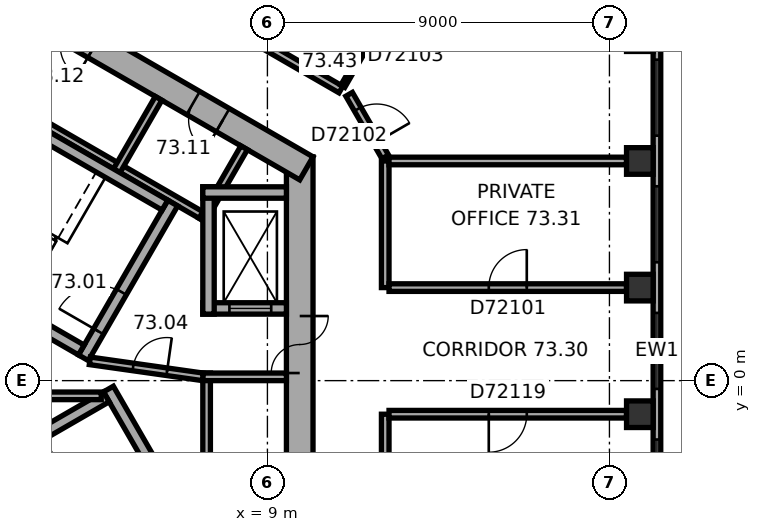
"""IFC4 building model, lengths in metres.
Left out: names, types, materials, properties, quantities, classifications, styles, units other than length and angle.
Written with IfcOpenShell. Run it as: python <this file> out.ifc"""

import sys

from ifc_helpers import new_model, si_unit, direction, frame, frame_2d, origin, origin_2d, place, context, subcontext, project, spatial, rectangle, extrude, element, fill, save


model = new_model("IFC4")
c1 = context("Model", 3, precision=1e-05, world=origin(), true_north=direction((0.0, 1.0)))
c2 = subcontext(c1, "Body", "Model", "MODEL_VIEW")
j1 = project(units=[si_unit("LENGTHUNIT", "METRE"), si_unit("PLANEANGLEUNIT", "RADIAN")], contexts=[c1])
p1 = place(None, origin())
s1 = spatial("IfcSite", under=j1, at=p1, CompositionType="ELEMENT")
p2 = place(p1, origin())
s2 = spatial("IfcBuilding", under=s1, at=p2, CompositionType="ELEMENT")
p3 = place(p2, frame((0.0, 0.0, 296.8)))
s3 = spatial("IfcBuildingStorey", under=s2, at=p3, CompositionType="ELEMENT", Elevation=296.8)
for number, where, z_axis, x_axis in (
    (1, (18.8, -0.883, 0.0), (0.0, 0.0, 1.0), (0.0, 1.0, 0.0)),
    (2, (18.8, 2.448, 0.0), (0.0, 0.0, 1.0), (0.0, 1.0, 0.0)),
    (3, (18.8, 5.78, 0.0), (0.0, 0.0, 1.0), (0.0, 1.0, 0.0)),
):
    element("IfcColumn", number, at=place(p3, frame(where, z_axis=z_axis, x_axis=x_axis)), inside=s3, PredefinedType="COLUMN", context=c2, shape_type="SweptSolid", body=[
        extrude(rectangle(XDim=0.7, YDim=0.7, at=origin_2d()), origin(), (0.0, 0.0, 1.0), 3.7),
    ])
p4 = place(p3, frame((9.85, -5.889, 0.0), z_axis=(0.0, 0.0, 1.0), x_axis=(0.0, 1.0, 0.0)))
e4 = element("IfcWall", 4, at=p4, inside=s3, PredefinedType="SHEAR", context=c2, shape_type="SweptSolid", body=[
    extrude(rectangle(XDim=11.778, YDim=0.7, at=frame_2d((5.889, 0.0))), origin(), (0.0, 0.0, 1.0), 3.7),
])
p5 = place(p4, frame((6.089, 0.0, 0.0)))
e5 = element("IfcOpeningElement", 5, at=p5, cuts=e4, PredefinedType="OPENING", context=c2, shape_type="SweptSolid", body=[
    extrude(rectangle(XDim=1.5, YDim=2.1, at=frame_2d((0.75, 1.05))), frame((0.0, 0.36, 0.0), z_axis=(0.0, -1.0, 0.0), x_axis=(1.0, 0.0, 0.0)), (0.0, 0.0, 1.0), 0.72),
])
p6 = place(p4, frame((2.939, 0.0, 0.0)))
e6 = element("IfcOpeningElement", 6, at=p6, cuts=e4, PredefinedType="OPENING", context=c2, shape_type="SweptSolid", body=[
    extrude(rectangle(XDim=0.9, YDim=2.1, at=frame_2d((0.45, 1.05))), frame((0.0, 0.36, 0.0), z_axis=(0.0, -1.0, 0.0), x_axis=(1.0, 0.0, 0.0)), (0.0, 0.0, 1.0), 0.72),
])
p7 = place(p3, frame((10.025, 5.586, 0.0), z_axis=(0.0, 0.0, 1.0), x_axis=(-0.866026453023, 0.499998182661, 0.0)))
e7 = element("IfcWall", 7, at=p7, inside=s3, PredefinedType="SHEAR", context=c2, shape_type="SweptSolid", body=[
    extrude(rectangle(XDim=11.778, YDim=0.7, at=frame_2d((5.889, 0.0))), origin(), (0.0, 0.0, 1.0), 3.7),
])
p8 = place(p7, frame((2.539, 0.0, 0.0)))
e8 = element("IfcOpeningElement", 8, at=p8, cuts=e7, PredefinedType="OPENING", context=c2, shape_type="SweptSolid", body=[
    extrude(rectangle(XDim=0.9, YDim=2.1, at=frame_2d((0.45, 1.05))), frame((0.0, 0.36, 0.0), z_axis=(0.0, -1.0, 0.0), x_axis=(1.0, 0.0, 0.0)), (0.0, 0.0, 1.0), 0.72),
])
p9 = place(p7, frame((6.439, 0.0, 0.0)))
e9 = element("IfcOpeningElement", 9, at=p9, cuts=e7, PredefinedType="OPENING", context=c2, shape_type="SweptSolid", body=[
    extrude(rectangle(XDim=0.9, YDim=2.1, at=frame_2d((0.45, 1.05))), frame((0.0, 0.36, 0.0), z_axis=(0.0, -1.0, 0.0), x_axis=(1.0, 0.0, 0.0)), (0.0, 0.0, 1.0), 0.72),
])
p10 = place(p3, frame((19.25, -8.084, 0.0), z_axis=(0.0, 0.0, 1.0), x_axis=(0.0, 1.0, 0.0)))
e10 = element("IfcWall", 10, at=p10, inside=s3, PredefinedType="STANDARD", context=c2, shape_type="SweptSolid", body=[
    extrude(rectangle(XDim=17.731, YDim=0.2, at=frame_2d((8.866, 0.0))), origin(), (0.0, 0.0, 1.0), 3.7),
])
p11 = place(p10, frame((1.203, 0.0, 0.9)))
e11 = element("IfcOpeningElement", 11, at=p11, cuts=e10, PredefinedType="OPENING", context=c2, shape_type="SweptSolid", body=[
    extrude(rectangle(XDim=2.0, YDim=2.0, at=frame_2d((1.0, 1.0))), frame((0.0, 0.11, 0.0), z_axis=(0.0, -1.0, 0.0), x_axis=(1.0, 0.0, 0.0)), (0.0, 0.0, 1.0), 0.22),
])
p12 = place(p10, frame((4.535, 0.0, 0.9)))
e12 = element("IfcOpeningElement", 12, at=p12, cuts=e10, PredefinedType="OPENING", context=c2, shape_type="SweptSolid", body=[
    extrude(rectangle(XDim=2.0, YDim=2.0, at=frame_2d((1.0, 1.0))), frame((0.0, 0.11, 0.0), z_axis=(0.0, -1.0, 0.0), x_axis=(1.0, 0.0, 0.0)), (0.0, 0.0, 1.0), 0.22),
])
p13 = place(p10, frame((7.866, 0.0, 0.9)))
e13 = element("IfcOpeningElement", 13, at=p13, cuts=e10, PredefinedType="OPENING", context=c2, shape_type="SweptSolid", body=[
    extrude(rectangle(XDim=2.0, YDim=2.0, at=frame_2d((1.0, 1.0))), frame((0.0, 0.11, 0.0), z_axis=(0.0, -1.0, 0.0), x_axis=(1.0, 0.0, 0.0)), (0.0, 0.0, 1.0), 0.22),
])
p14 = place(p10, frame((11.198, 0.0, 0.9)))
e14 = element("IfcOpeningElement", 14, at=p14, cuts=e10, PredefinedType="OPENING", context=c2, shape_type="SweptSolid", body=[
    extrude(rectangle(XDim=2.0, YDim=2.0, at=frame_2d((1.0, 1.0))), frame((0.0, 0.11, 0.0), z_axis=(0.0, -1.0, 0.0), x_axis=(1.0, 0.0, 0.0)), (0.0, 0.0, 1.0), 0.22),
])
p15 = place(p10, frame((14.53, 0.0, 0.9)))
e15 = element("IfcOpeningElement", 15, at=p15, cuts=e10, PredefinedType="OPENING", context=c2, shape_type="SweptSolid", body=[
    extrude(rectangle(XDim=2.0, YDim=2.0, at=frame_2d((1.0, 1.0))), frame((0.0, 0.11, 0.0), z_axis=(0.0, -1.0, 0.0), x_axis=(1.0, 0.0, 0.0)), (0.0, 0.0, 1.0), 0.22),
])
p16 = place(p3, frame((7.4, -5.2, 0.0), z_axis=(0.0, 0.0, 1.0), x_axis=(0.0, 1.0, 0.0)))
e16 = element("IfcWall", 16, at=p16, inside=s3, PredefinedType="PARTITIONING", context=c2, shape_type="SweptSolid", body=[
    extrude(rectangle(XDim=5.4, YDim=0.2, at=frame_2d((2.7, 0.0))), origin(), (0.0, 0.0, 1.0), 3.35),
])
p17 = place(p3, frame((7.3, 0.1, 0.0), z_axis=(0.0, 0.0, 1.0), x_axis=(1.0, 0.0, 0.0)))
e17 = element("IfcWall", 17, at=p17, inside=s3, PredefinedType="PARTITIONING", context=c2, shape_type="SweptSolid", body=[
    extrude(rectangle(XDim=2.2, YDim=0.2, at=frame_2d((1.1, 0.0))), origin(), (0.0, 0.0, 1.0), 3.35),
])
p18 = place(p3, frame((7.424, 4.259, 0.0), z_axis=(0.0, 0.0, 1.0), x_axis=(-0.866026010844, 0.49999894854, 0.0)))
e18 = element("IfcWall", 18, at=p18, inside=s3, PredefinedType="PARTITIONING", context=c2, shape_type="SweptSolid", body=[
    extrude(rectangle(XDim=8.0, YDim=0.2, at=frame_2d((4.0, 0.0))), origin(), (0.0, 0.0, 1.0), 3.35),
])
for number, where, z_axis, x_axis in (
    (19, (7.287, 4.222, 0.0), (0.0, 0.0, 1.0), (0.5, 0.866, 0.0)),
    (20, (5.036, 5.522, 0.0), (0.0, 0.0, 1.0), (0.5, 0.866, 0.0)),
):
    element("IfcWall", number, at=place(p3, frame(where, z_axis=z_axis, x_axis=x_axis)), inside=s3, PredefinedType="PARTITIONING", context=c2, shape_type="SweptSolid", body=[
        extrude(rectangle(XDim=2.2, YDim=0.2, at=frame_2d((1.1, 0.0))), origin(), (0.0, 0.0, 1.0), 3.35),
    ])
p19 = place(p3, frame((4.158, 0.602, 0.0), z_axis=(0.0, 0.0, 1.0), x_axis=(0.499977259774, 0.866038532462, 0.0)))
e21 = element("IfcWall", 21, at=p19, inside=s3, PredefinedType="SHEAR", context=c2, shape_type="SweptSolid", body=[
    extrude(rectangle(XDim=4.7, YDim=0.3, at=frame_2d((2.35, 0.0))), origin(), (0.0, 0.0, 1.0), 3.35),
])
p20 = place(p19, frame((0.8, 0.0, 0.0)))
e22 = element("IfcOpeningElement", 22, at=p20, cuts=e21, PredefinedType="OPENING", context=c2, shape_type="SweptSolid", body=[
    extrude(rectangle(XDim=1.2, YDim=2.1, at=frame_2d((0.6, 1.05))), frame((0.0, 0.16, 0.0), z_axis=(0.0, -1.0, 0.0), x_axis=(1.0, 0.0, 0.0)), (0.0, 0.0, 1.0), 0.32),
])
for number, where, z_axis, x_axis in (
    (23, (4.103, 0.807, 0.0), (0.0, 0.0, 1.0), (-0.866, 0.5, 0.0)),
    (24, (6.303, 4.617, 0.0), (0.0, 0.0, 1.0), (-0.866, 0.5, 0.0)),
):
    element("IfcWall", number, at=place(p3, frame(where, z_axis=z_axis, x_axis=x_axis)), inside=s3, PredefinedType="SHEAR", context=c2, shape_type="SweptSolid", body=[
        extrude(rectangle(XDim=7.06, YDim=0.3, at=frame_2d((3.53, 0.0))), origin(), (0.0, 0.0, 1.0), 3.35),
    ])
p21 = place(p3, frame((4.816, -0.222, 0.0), z_axis=(0.0, 0.0, 1.0), x_axis=(0.499977259774, -0.866038532462, 0.0)))
e25 = element("IfcWall", 25, at=p21, inside=s3, PredefinedType="SHEAR", context=c2, shape_type="SweptSolid", body=[
    extrude(rectangle(XDim=4.7, YDim=0.3, at=frame_2d((2.35, 0.0))), origin(), (0.0, 0.0, 1.0), 3.35),
])
p22 = place(p3, frame((-1.353, -3.957, 0.0), z_axis=(0.0, 0.0, 1.0), x_axis=(0.866027801685, 0.499995846692, 0.0)))
e26 = element("IfcWall", 26, at=p22, inside=s3, PredefinedType="SHEAR", context=c2, shape_type="SweptSolid", body=[
    extrude(rectangle(XDim=7.06, YDim=0.3, at=frame_2d((3.53, 0.0))), origin(), (0.0, 0.0, 1.0), 3.35),
])
p23 = place(p3, frame((7.3, 1.9, 0.0), z_axis=(0.0, 0.0, 1.0), x_axis=(1.0, 0.0, 0.0)))
e27 = element("IfcWall", 27, at=p23, inside=s3, PredefinedType="SHEAR", context=c2, shape_type="SweptSolid", body=[
    extrude(rectangle(XDim=2.2, YDim=0.3, at=frame_2d((1.1, 0.0))), origin(), (0.0, 0.0, 1.0), 3.35),
])
p24 = place(p23, frame((0.7, 0.0, 0.0)))
e28 = element("IfcOpeningElement", 28, at=p24, cuts=e27, PredefinedType="OPENING", context=c2, shape_type="SweptSolid", body=[
    extrude(rectangle(XDim=1.1, YDim=2.1, at=frame_2d((0.55, 1.05))), frame((0.0, 0.16, 0.0), z_axis=(0.0, -1.0, 0.0), x_axis=(1.0, 0.0, 0.0)), (0.0, 0.0, 1.0), 0.32),
])
p25 = place(p3, frame((7.45, 1.75, 0.0), z_axis=(0.0, 0.0, 1.0), x_axis=(0.0, 1.0, 0.0)))
e29 = element("IfcWall", 29, at=p25, inside=s3, PredefinedType="SHEAR", context=c2, shape_type="SweptSolid", body=[
    extrude(rectangle(XDim=3.35, YDim=0.3, at=frame_2d((1.675, 0.0))), origin(), (0.0, 0.0, 1.0), 3.35),
])
p26 = place(p3, frame((7.3, 4.95, 0.0), z_axis=(0.0, 0.0, 1.0), x_axis=(1.0, 0.0, 0.0)))
e30 = element("IfcWall", 30, at=p26, inside=s3, PredefinedType="SHEAR", context=c2, shape_type="SweptSolid", body=[
    extrude(rectangle(XDim=2.2, YDim=0.3, at=frame_2d((1.1, 0.0))), origin(), (0.0, 0.0, 1.0), 3.35),
])
p27 = place(p3, frame((4.327, 0.521, 0.0), z_axis=(0.0, 0.0, 1.0), x_axis=(0.990124376366, -0.14019172346, 0.0)))
e31 = element("IfcWall", 31, at=p27, inside=s3, PredefinedType="PARTITIONING", context=c2, shape_type="SweptSolid", body=[
    extrude(rectangle(XDim=3.002, YDim=0.2, at=frame_2d((1.501, 0.0))), origin(), (0.0, 0.0, 1.0), 3.35),
])
p28 = place(p27, frame((1.15, 0.0, 0.0)))
e32 = element("IfcOpeningElement", 32, at=p28, cuts=e31, PredefinedType="OPENING", context=c2, shape_type="SweptSolid", body=[
    extrude(rectangle(XDim=0.9, YDim=2.1, at=frame_2d((0.45, 1.05))), frame((0.0, 0.11, 0.0), z_axis=(0.0, -1.0, 0.0), x_axis=(1.0, 0.0, 0.0)), (0.0, 0.0, 1.0), 0.22),
])
p29 = place(p3, frame((-2.72, -0.4, 0.0), z_axis=(0.0, 0.0, 1.0), x_axis=(1.0, 0.0, 0.0)))
e33 = element("IfcWall", 33, at=p29, inside=s3, PredefinedType="PARTITIONING", context=c2, shape_type="SweptSolid", body=[
    extrude(rectangle(XDim=7.347, YDim=0.2, at=frame_2d((3.674, 0.0))), origin(), (0.0, 0.0, 1.0), 3.35),
])
p30 = place(p3, frame((10.934, 7.659, 0.0), z_axis=(0.0, 0.0, 1.0), x_axis=(-0.866034411203, 0.499984398369, 0.0)))
e34 = element("IfcWall", 34, at=p30, inside=s3, PredefinedType="PARTITIONING", context=c2, shape_type="SweptSolid", body=[
    extrude(rectangle(XDim=3.927, YDim=0.2, at=frame_2d((1.963, 0.0))), origin(), (0.0, 0.0, 1.0), 3.35),
])
p31 = place(p3, frame((12.1, -5.639, 0.0), z_axis=(0.0, 0.0, 1.0), x_axis=(0.0, 1.0, 0.0)))
e35 = element("IfcWall", 35, at=p31, inside=s3, PredefinedType="PARTITIONING", context=c2, shape_type="SweptSolid", body=[
    extrude(rectangle(XDim=4.756, YDim=0.2, at=frame_2d((2.378, 0.0))), origin(), (0.0, 0.0, 1.0), 3.35),
])
p32 = place(p3, frame((12.1, 2.448, 0.0), z_axis=(0.0, 0.0, 1.0), x_axis=(0.0, 1.0, 0.0)))
e36 = element("IfcWall", 36, at=p32, inside=s3, PredefinedType="PARTITIONING", context=c2, shape_type="SweptSolid", body=[
    extrude(rectangle(XDim=3.332, YDim=0.2, at=frame_2d((1.666, 0.0))), origin(), (0.0, 0.0, 1.0), 3.35),
])
p33 = place(p3, frame((12.1, 5.889, 0.0), z_axis=(0.0, 0.0, 1.0), x_axis=(-0.500063520245, 0.865988727248, 0.0)))
e37 = element("IfcWall", 37, at=p33, inside=s3, PredefinedType="PARTITIONING", context=c2, shape_type="SweptSolid", body=[
    extrude(rectangle(XDim=1.9, YDim=0.2, at=frame_2d((0.95, 0.0))), origin(), (0.0, 0.0, 1.0), 3.35),
])
p34 = place(p33, frame((0.45, 0.0, 0.0)))
e38 = element("IfcOpeningElement", 38, at=p34, cuts=e37, PredefinedType="OPENING", context=c2, shape_type="SweptSolid", body=[
    extrude(rectangle(XDim=1.0, YDim=2.1, at=frame_2d((0.5, 1.05))), frame((0.0, 0.11, 0.0), z_axis=(0.0, -1.0, 0.0), x_axis=(1.0, 0.0, 0.0)), (0.0, 0.0, 1.0), 0.22),
])
p35 = place(p3, frame((12.2, -0.883, 0.0), z_axis=(0.0, 0.0, 1.0), x_axis=(1.0, 0.0, 0.0)))
e39 = element("IfcWall", 39, at=p35, inside=s3, PredefinedType="PARTITIONING", context=c2, shape_type="SweptSolid", body=[
    extrude(rectangle(XDim=6.25, YDim=0.2, at=frame_2d((3.125, 0.0))), origin(), (0.0, 0.0, 1.0), 2.65),
])
p36 = place(p35, frame((2.625, 0.0, 0.0)))
e40 = element("IfcOpeningElement", 40, at=p36, cuts=e39, PredefinedType="OPENING", context=c2, shape_type="SweptSolid", body=[
    extrude(rectangle(XDim=1.0, YDim=2.1, at=frame_2d((0.5, 1.05))), frame((0.0, 0.11, 0.0), z_axis=(0.0, -1.0, 0.0), x_axis=(1.0, 0.0, 0.0)), (0.0, 0.0, 1.0), 0.22),
])
p37 = place(p3, frame((12.204, 9.859, 0.0), z_axis=(0.0, 0.0, 1.0), x_axis=(-0.500077547548, -0.865980627057, 0.0)))
e41 = element("IfcWall", 41, at=p37, inside=s3, PredefinedType="PARTITIONING", context=c2, shape_type="SweptSolid", body=[
    extrude(rectangle(XDim=2.44, YDim=0.12, at=frame_2d((1.22, 0.0))), origin(), (0.0, 0.0, 1.0), 3.35),
])
p38 = place(p37, frame((0.77, 0.0, 0.0)))
e42 = element("IfcOpeningElement", 42, at=p38, cuts=e41, PredefinedType="OPENING", context=c2, shape_type="SweptSolid", body=[
    extrude(rectangle(XDim=0.9, YDim=2.1, at=frame_2d((0.45, 1.05))), frame((0.0, 0.07, 0.0), z_axis=(0.0, -1.0, 0.0), x_axis=(1.0, 0.0, 0.0)), (0.0, 0.0, 1.0), 0.14),
])
p39 = place(p3, frame((18.45, 2.448, 0.0), z_axis=(0.0, 0.0, 1.0), x_axis=(-1.0, 0.0, 0.0)))
e43 = element("IfcWall", 43, at=p39, inside=s3, PredefinedType="PARTITIONING", context=c2, shape_type="SweptSolid", body=[
    extrude(rectangle(XDim=6.25, YDim=0.2, at=frame_2d((3.125, 0.0))), origin(), (0.0, 0.0, 1.0), 3.35),
])
p40 = place(p39, frame((2.625, 0.0, 0.0)))
e44 = element("IfcOpeningElement", 44, at=p40, cuts=e43, PredefinedType="OPENING", context=c2, shape_type="SweptSolid", body=[
    extrude(rectangle(XDim=1.0, YDim=2.1, at=frame_2d((0.5, 1.05))), frame((0.0, 0.11, 0.0), z_axis=(0.0, -1.0, 0.0), x_axis=(1.0, 0.0, 0.0)), (0.0, 0.0, 1.0), 0.22),
])
p41 = place(p3, frame((18.45, 5.78, 0.0), z_axis=(0.0, 0.0, 1.0), x_axis=(-1.0, 0.0, 0.0)))
e45 = element("IfcWall", 45, at=p41, inside=s3, PredefinedType="PARTITIONING", context=c2, shape_type="SweptSolid", body=[
    extrude(rectangle(XDim=6.25, YDim=0.2, at=frame_2d((3.125, 0.0))), origin(), (0.0, 0.0, 1.0), 3.35),
])
p42 = place(p12, origin())
e46 = element("IfcWindow", 46, at=p42, inside=s3, PartitioningType="SINGLE_PANEL", PredefinedType="WINDOW", context=c2, shape_type="SweptSolid", body=[
    extrude(rectangle(XDim=2.0, YDim=2.0, at=frame_2d((1.0, 1.0))), frame((0.0, 0.03, 0.0), z_axis=(0.0, -1.0, 0.0), x_axis=(1.0, 0.0, 0.0)), (0.0, 0.0, 1.0), 0.06),
])
fill(e12, e46)
p43 = place(p13, origin())
e47 = element("IfcWindow", 47, at=p43, inside=s3, PartitioningType="SINGLE_PANEL", PredefinedType="WINDOW", context=c2, shape_type="SweptSolid", body=[
    extrude(rectangle(XDim=2.0, YDim=2.0, at=frame_2d((1.0, 1.0))), frame((0.0, 0.03, 0.0), z_axis=(0.0, -1.0, 0.0), x_axis=(1.0, 0.0, 0.0)), (0.0, 0.0, 1.0), 0.06),
])
fill(e13, e47)
p44 = place(p14, origin())
e48 = element("IfcWindow", 48, at=p44, inside=s3, PartitioningType="SINGLE_PANEL", PredefinedType="WINDOW", context=c2, shape_type="SweptSolid", body=[
    extrude(rectangle(XDim=2.0, YDim=2.0, at=frame_2d((1.0, 1.0))), frame((0.0, 0.03, 0.0), z_axis=(0.0, -1.0, 0.0), x_axis=(1.0, 0.0, 0.0)), (0.0, 0.0, 1.0), 0.06),
])
fill(e14, e48)
p45 = place(p15, origin())
e49 = element("IfcWindow", 49, at=p45, inside=s3, PartitioningType="SINGLE_PANEL", PredefinedType="WINDOW", context=c2, shape_type="SweptSolid", body=[
    extrude(rectangle(XDim=2.0, YDim=2.0, at=frame_2d((1.0, 1.0))), frame((0.0, 0.03, 0.0), z_axis=(0.0, -1.0, 0.0), x_axis=(1.0, 0.0, 0.0)), (0.0, 0.0, 1.0), 0.06),
])
fill(e15, e49)
p46 = place(p5, origin())
e50 = element("IfcDoor", 50, at=p46, inside=s3, OperationType="DOUBLE_DOOR_SINGLE_SWING", PredefinedType="DOOR", context=c2, shape_type="SweptSolid", body=[
    extrude(rectangle(XDim=1.5, YDim=2.1, at=frame_2d((0.75, 1.05))), frame((0.0, 0.025, 0.0), z_axis=(0.0, -1.0, 0.0), x_axis=(1.0, 0.0, 0.0)), (0.0, 0.0, 1.0), 0.05),
])
fill(e5, e50)
p47 = place(p20, origin())
e51 = element("IfcDoor", 51, at=p47, inside=s3, OperationType="SINGLE_SWING_RIGHT", PredefinedType="DOOR", context=c2, shape_type="SweptSolid", body=[
    extrude(rectangle(XDim=1.2, YDim=2.1, at=frame_2d((0.6, 1.05))), frame((0.0, 0.025, 0.0), z_axis=(0.0, -1.0, 0.0), x_axis=(1.0, 0.0, 0.0)), (0.0, 0.0, 1.0), 0.05),
])
fill(e22, e51)
p48 = place(p28, origin())
e52 = element("IfcDoor", 52, at=p48, inside=s3, OperationType="SINGLE_SWING_LEFT", PredefinedType="DOOR", context=c2, shape_type="SweptSolid", body=[
    extrude(rectangle(XDim=0.9, YDim=2.1, at=frame_2d((0.45, 1.05))), frame((0.0, 0.025, 0.0), z_axis=(0.0, -1.0, 0.0), x_axis=(1.0, 0.0, 0.0)), (0.0, 0.0, 1.0), 0.05),
])
fill(e32, e52)
p49 = place(p8, origin())
e53 = element("IfcDoor", 53, at=p49, inside=s3, OperationType="SINGLE_SWING_LEFT", PredefinedType="DOOR", context=c2, shape_type="SweptSolid", body=[
    extrude(rectangle(XDim=0.9, YDim=2.1, at=frame_2d((0.45, 1.05))), frame((0.0, 0.025, 0.0), z_axis=(0.0, -1.0, 0.0), x_axis=(1.0, 0.0, 0.0)), (0.0, 0.0, 1.0), 0.05),
])
fill(e8, e53)
p50 = place(p24, origin())
e54 = element("IfcDoor", 54, at=p50, inside=s3, OperationType="DOUBLE_DOOR_SLIDING", PredefinedType="DOOR", context=c2, shape_type="SweptSolid", body=[
    extrude(rectangle(XDim=1.1, YDim=2.1, at=frame_2d((0.55, 1.05))), frame((0.0, 0.025, 0.0), z_axis=(0.0, -1.0, 0.0), x_axis=(1.0, 0.0, 0.0)), (0.0, 0.0, 1.0), 0.05),
])
fill(e28, e54)
p51 = place(p40, origin())
e55 = element("IfcDoor", 55, at=p51, inside=s3, OperationType="SINGLE_SWING_LEFT", PredefinedType="DOOR", context=c2, shape_type="SweptSolid", body=[
    extrude(rectangle(XDim=1.0, YDim=2.1, at=frame_2d((0.5, 1.05))), frame((0.0, 0.025, 0.0), z_axis=(0.0, -1.0, 0.0), x_axis=(1.0, 0.0, 0.0)), (0.0, 0.0, 1.0), 0.05),
])
fill(e44, e55)
p52 = place(p34, origin())
e56 = element("IfcDoor", 56, at=p52, inside=s3, OperationType="SINGLE_SWING_LEFT", PredefinedType="DOOR", context=c2, shape_type="SweptSolid", body=[
    extrude(rectangle(XDim=1.0, YDim=2.1, at=frame_2d((0.5, 1.05))), frame((0.0, 0.025, 0.0), z_axis=(0.0, -1.0, 0.0), x_axis=(1.0, 0.0, 0.0)), (0.0, 0.0, 1.0), 0.05),
])
fill(e38, e56)
p53 = place(p38, origin())
e57 = element("IfcDoor", 57, at=p53, inside=s3, OperationType="SINGLE_SWING_LEFT", PredefinedType="DOOR", context=c2, shape_type="SweptSolid", body=[
    extrude(rectangle(XDim=0.9, YDim=2.1, at=frame_2d((0.45, 1.05))), frame((0.0, 0.025, 0.0), z_axis=(0.0, -1.0, 0.0), x_axis=(1.0, 0.0, 0.0)), (0.0, 0.0, 1.0), 0.05),
])
fill(e42, e57)
p54 = place(p36, origin())
e58 = element("IfcDoor", 58, at=p54, inside=s3, OperationType="SINGLE_SWING_LEFT", PredefinedType="DOOR", context=c2, shape_type="SweptSolid", body=[
    extrude(rectangle(XDim=1.0, YDim=2.1, at=frame_2d((0.5, 1.05))), frame((0.0, 0.025, 0.0), z_axis=(0.0, -1.0, 0.0), x_axis=(1.0, 0.0, 0.0)), (0.0, 0.0, 1.0), 0.05),
])
fill(e40, e58)
save(model, sys.argv[1])
